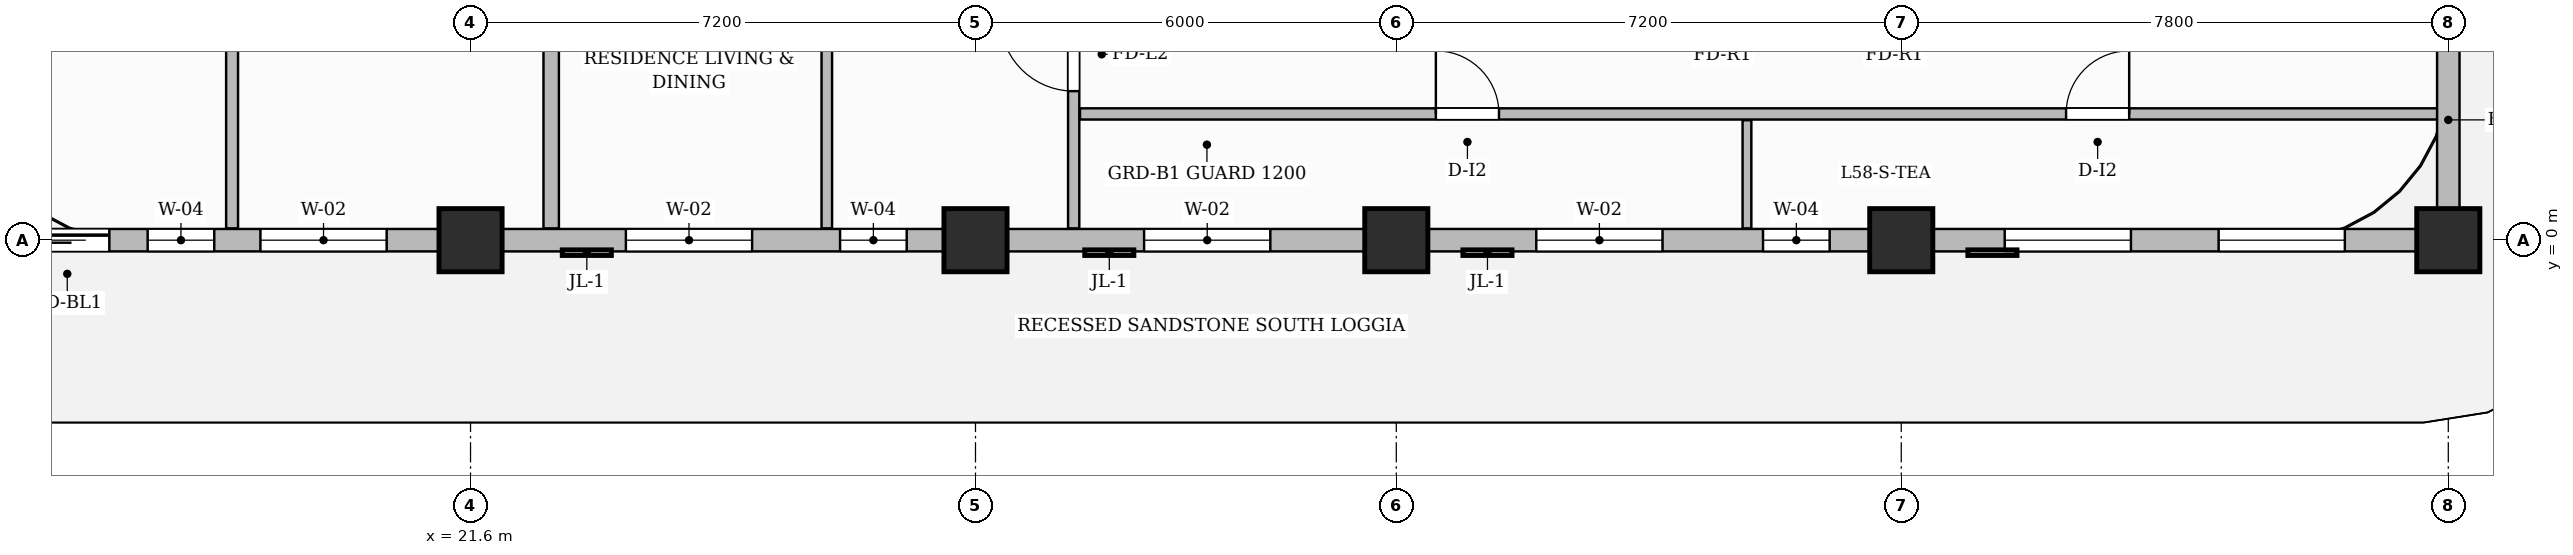
"""IFC4 building model, lengths in metres.
Left out: names, types, materials, properties, quantities, classifications, styles, units other than length and angle.
Written with IfcOpenShell. Run it as: python <this file> out.ifc"""

import sys

from ifc_helpers import new_model, si_unit, direction, frame, frame_2d, origin, origin_2d, place, context, subcontext, project, spatial, rectangle, extrude, source, transform, mapped, element, fill, save


model = new_model("IFC4")
c1 = context("Model", 3, precision=1e-05, world=origin(), true_north=direction((0.0, 1.0)))
c2 = subcontext(c1, "Body", "Model", "MODEL_VIEW")
j1 = project(units=[si_unit("LENGTHUNIT", "METRE"), si_unit("PLANEANGLEUNIT", "RADIAN")], contexts=[c1])
p1 = place(None, origin())
s1 = spatial("IfcSite", under=j1, at=p1, CompositionType="ELEMENT")
p2 = place(p1, origin())
s2 = spatial("IfcBuilding", under=s1, at=p2, CompositionType="ELEMENT")
p3 = place(p2, frame((0.0, 0.0, 232.7)))
s3 = spatial("IfcBuildingStorey", under=s2, at=p3, CompositionType="ELEMENT", Elevation=232.7)
m1 = source(origin(), c2, "Body", "SweptSolid", [
    extrude(rectangle(XDim=0.9, YDim=0.9, at=origin_2d()), origin(), (0.0, 0.0, 1.0), 3.85),
])
for number, where, z_axis, x_axis in (
    (1, (21.6, 0.0, 0.0), (0.0, 0.0, 1.0), (1.0, 0.0, 0.0)),
    (2, (28.8, 0.0, 0.0), (0.0, 0.0, 1.0), (1.0, 0.0, 0.0)),
    (3, (34.8, 0.0, 0.0), (0.0, 0.0, 1.0), (1.0, 0.0, 0.0)),
    (4, (42.0, 0.0, 0.0), (0.0, 0.0, 1.0), (1.0, 0.0, 0.0)),
    (5, (49.8, 0.0, 0.0), (0.0, 0.0, 1.0), (1.0, 0.0, 0.0)),
):
    element("IfcColumn", number, at=place(p3, frame(where, z_axis=z_axis, x_axis=x_axis)), inside=s3, PredefinedType="COLUMN", context=c2, shape_type="MappedRepresentation", body=[
        mapped(m1, transform((0.0, 0.0, 0.0), scale=1.0)),
    ])
p4 = place(p3, frame((30.2, 0.168, 0.0), z_axis=(0.0, 0.0, 1.0), x_axis=(0.0, 1.0, 0.0)))
e6 = element("IfcWall", 6, at=p4, inside=s3, PredefinedType="PARTITIONING", context=c2, shape_type="SweptSolid", body=[
    extrude(rectangle(XDim=9.492, YDim=0.16, at=frame_2d((4.746, 0.0))), origin(), (0.0, 0.0, 1.0), 3.6),
])
p5 = place(p4, frame((1.957, 0.0, 0.0)))
e7 = element("IfcOpeningElement", 7, at=p5, cuts=e6, PredefinedType="OPENING", context=c2, shape_type="SweptSolid", body=[
    extrude(rectangle(XDim=1.05, YDim=2.15, at=frame_2d((0.525, 1.075))), frame((0.0, 0.09, 0.0), z_axis=(0.0, -1.0, 0.0), x_axis=(1.0, 0.0, 0.0)), (0.0, 0.0, 1.0), 0.18),
])
p6 = place(p3, frame((30.29, 1.8, 0.0), z_axis=(0.0, 0.0, 1.0), x_axis=(1.0, 0.0, 0.0)))
e8 = element("IfcWall", 8, at=p6, inside=s3, PredefinedType="PARTITIONING", context=c2, shape_type="SweptSolid", body=[
    extrude(rectangle(XDim=19.37, YDim=0.16, at=frame_2d((9.685, 0.0))), origin(), (0.0, 0.0, 1.0), 3.6),
])
p7 = place(p6, frame((5.074, 0.0, 0.0)))
e9 = element("IfcOpeningElement", 9, at=p7, cuts=e8, PredefinedType="OPENING", context=c2, shape_type="SweptSolid", body=[
    extrude(rectangle(XDim=0.9, YDim=2.15, at=frame_2d((0.45, 1.075))), frame((0.0, 0.09, 0.0), z_axis=(0.0, -1.0, 0.0), x_axis=(1.0, 0.0, 0.0)), (0.0, 0.0, 1.0), 0.18),
])
p8 = place(p6, frame((14.06, 0.0, 0.0)))
e10 = element("IfcOpeningElement", 10, at=p8, cuts=e8, PredefinedType="OPENING", context=c2, shape_type="SweptSolid", body=[
    extrude(rectangle(XDim=0.9, YDim=2.15, at=frame_2d((0.45, 1.075))), frame((0.0, 0.09, 0.0), z_axis=(0.0, -1.0, 0.0), x_axis=(1.0, 0.0, 0.0)), (0.0, 0.0, 1.0), 0.18),
])
p9 = place(p3, frame((39.8, 0.168, 0.0), z_axis=(0.0, 0.0, 1.0), x_axis=(0.0, 1.0, 0.0)))
e11 = element("IfcWall", 11, at=p9, inside=s3, PredefinedType="PARTITIONING", context=c2, shape_type="SweptSolid", body=[
    extrude(rectangle(XDim=1.542, YDim=0.125, at=frame_2d((0.771, 0.0))), origin(), (0.0, 0.0, 1.0), 3.6),
])
p10 = place(p3, frame((18.2, 0.168, 0.0), z_axis=(0.0, 0.0, 1.0), x_axis=(0.0, 1.0, 0.0)))
e12 = element("IfcWall", 12, at=p10, inside=s3, PredefinedType="PARTITIONING", context=c2, shape_type="SweptSolid", body=[
    extrude(rectangle(XDim=9.492, YDim=0.17, at=frame_2d((4.746, 0.0))), origin(), (0.0, 0.0, 1.0), 3.315),
])
p11 = place(p3, frame((22.75, 0.168, 0.0), z_axis=(0.0, 0.0, 1.0), x_axis=(0.0, 1.0, 0.0)))
e13 = element("IfcWall", 13, at=p11, inside=s3, PredefinedType="PARTITIONING", context=c2, shape_type="SweptSolid", body=[
    extrude(rectangle(XDim=9.492, YDim=0.22, at=frame_2d((4.746, 0.0))), origin(), (0.0, 0.0, 1.0), 3.6),
])
p12 = place(p3, frame((26.68, 0.168, 0.0), z_axis=(0.0, 0.0, 1.0), x_axis=(0.0, 1.0, 0.0)))
e14 = element("IfcWall", 14, at=p12, inside=s3, PredefinedType="PARTITIONING", context=c2, shape_type="SweptSolid", body=[
    extrude(rectangle(XDim=9.492, YDim=0.15, at=frame_2d((4.746, 0.0))), origin(), (0.0, 0.0, 1.0), 3.6),
])
p13 = place(p12, frame((8.057, 0.0, 0.0)))
e15 = element("IfcOpeningElement", 15, at=p13, cuts=e14, PredefinedType="OPENING", context=c2, shape_type="SweptSolid", body=[
    extrude(rectangle(XDim=0.9, YDim=2.15, at=frame_2d((0.45, 1.075))), frame((0.0, 0.085, 0.0), z_axis=(0.0, -1.0, 0.0), x_axis=(1.0, 0.0, 0.0)), (0.0, 0.0, 1.0), 0.17),
])
p14 = place(p3, frame((14.4, 0.0, 0.0), z_axis=(0.0, 0.0, 1.0), x_axis=(1.0, 0.0, 0.0)))
e16 = element("IfcWall", 16, at=p14, inside=s3, PredefinedType="SOLIDWALL", context=c2, shape_type="SweptSolid", body=[
    extrude(rectangle(XDim=35.4, YDim=0.32, at=frame_2d((17.7, 0.0))), origin(), (0.0, 0.0, 1.0), 3.135),
])
p15 = place(p14, frame((0.85, 0.0, 0.0)))
e17 = element("IfcOpeningElement", 17, at=p15, cuts=e16, PredefinedType="OPENING", context=c2, shape_type="SweptSolid", body=[
    extrude(rectangle(XDim=1.2, YDim=2.2, at=frame_2d((0.6, 1.1))), frame((0.0, 0.17, 0.0), z_axis=(0.0, -1.0, 0.0), x_axis=(1.0, 0.0, 0.0)), (0.0, 0.0, 1.0), 0.34),
])
p16 = place(p14, frame((2.596, 0.0, 0.8)))
e18 = element("IfcOpeningElement", 18, at=p16, cuts=e16, PredefinedType="OPENING", context=c2, shape_type="SweptSolid", body=[
    extrude(rectangle(XDim=0.95, YDim=1.75, at=frame_2d((0.475, 0.875))), frame((0.0, 0.17, 0.0), z_axis=(0.0, -1.0, 0.0), x_axis=(1.0, 0.0, 0.0)), (0.0, 0.0, 1.0), 0.34),
])
p17 = place(p14, frame((4.204, 0.0, 0.8)))
e19 = element("IfcOpeningElement", 19, at=p17, cuts=e16, PredefinedType="OPENING", context=c2, shape_type="SweptSolid", body=[
    extrude(rectangle(XDim=1.8, YDim=1.85, at=frame_2d((0.9, 0.925))), frame((0.0, 0.17, 0.0), z_axis=(0.0, -1.0, 0.0), x_axis=(1.0, 0.0, 0.0)), (0.0, 0.0, 1.0), 0.34),
])
p18 = place(p14, frame((9.415, 0.0, 0.8)))
e20 = element("IfcOpeningElement", 20, at=p18, cuts=e16, PredefinedType="OPENING", context=c2, shape_type="SweptSolid", body=[
    extrude(rectangle(XDim=1.8, YDim=1.85, at=frame_2d((0.9, 0.925))), frame((0.0, 0.17, 0.0), z_axis=(0.0, -1.0, 0.0), x_axis=(1.0, 0.0, 0.0)), (0.0, 0.0, 1.0), 0.34),
])
p19 = place(p14, frame((12.469, 0.0, 0.8)))
e21 = element("IfcOpeningElement", 21, at=p19, cuts=e16, PredefinedType="OPENING", context=c2, shape_type="SweptSolid", body=[
    extrude(rectangle(XDim=0.95, YDim=1.75, at=frame_2d((0.475, 0.875))), frame((0.0, 0.17, 0.0), z_axis=(0.0, -1.0, 0.0), x_axis=(1.0, 0.0, 0.0)), (0.0, 0.0, 1.0), 0.34),
])
p20 = place(p14, frame((16.804, 0.0, 0.8)))
e22 = element("IfcOpeningElement", 22, at=p20, cuts=e16, PredefinedType="OPENING", context=c2, shape_type="SweptSolid", body=[
    extrude(rectangle(XDim=1.8, YDim=1.85, at=frame_2d((0.9, 0.925))), frame((0.0, 0.17, 0.0), z_axis=(0.0, -1.0, 0.0), x_axis=(1.0, 0.0, 0.0)), (0.0, 0.0, 1.0), 0.34),
])
p21 = place(p14, frame((22.396, 0.0, 0.8)))
e23 = element("IfcOpeningElement", 23, at=p21, cuts=e16, PredefinedType="OPENING", context=c2, shape_type="SweptSolid", body=[
    extrude(rectangle(XDim=1.8, YDim=1.85, at=frame_2d((0.9, 0.925))), frame((0.0, 0.17, 0.0), z_axis=(0.0, -1.0, 0.0), x_axis=(1.0, 0.0, 0.0)), (0.0, 0.0, 1.0), 0.34),
])
p22 = place(p14, frame((25.629, 0.0, 0.8)))
e24 = element("IfcOpeningElement", 24, at=p22, cuts=e16, PredefinedType="OPENING", context=c2, shape_type="SweptSolid", body=[
    extrude(rectangle(XDim=0.95, YDim=1.75, at=frame_2d((0.475, 0.875))), frame((0.0, 0.17, 0.0), z_axis=(0.0, -1.0, 0.0), x_axis=(1.0, 0.0, 0.0)), (0.0, 0.0, 1.0), 0.34),
])
p23 = place(p14, frame((29.075, 0.0, 0.8)))
e25 = element("IfcOpeningElement", 25, at=p23, cuts=e16, PredefinedType="OPENING", context=c2, shape_type="SweptSolid", body=[
    extrude(rectangle(XDim=1.8, YDim=1.85, at=frame_2d((0.9, 0.925))), frame((0.0, 0.17, 0.0), z_axis=(0.0, -1.0, 0.0), x_axis=(1.0, 0.0, 0.0)), (0.0, 0.0, 1.0), 0.34),
])
p24 = place(p14, frame((32.125, 0.0, 0.8)))
e26 = element("IfcOpeningElement", 26, at=p24, cuts=e16, PredefinedType="OPENING", context=c2, shape_type="SweptSolid", body=[
    extrude(rectangle(XDim=1.8, YDim=1.85, at=frame_2d((0.9, 0.925))), frame((0.0, 0.17, 0.0), z_axis=(0.0, -1.0, 0.0), x_axis=(1.0, 0.0, 0.0)), (0.0, 0.0, 1.0), 0.34),
])
p25 = place(p3, frame((49.8, 0.05, 0.0), z_axis=(0.0, 0.0, 1.0), x_axis=(0.0, 1.0, 0.0)))
e27 = element("IfcWall", 27, at=p25, inside=s3, PredefinedType="SOLIDWALL", context=c2, shape_type="SweptSolid", body=[
    extrude(rectangle(XDim=3.33, YDim=0.32, at=frame_2d((1.665, 0.0))), origin(), (0.0, 0.0, 1.0), 3.6),
])
m2 = source(origin(), c2, "Body", "SweptSolid", [
    extrude(rectangle(XDim=1.05, YDim=2.15, at=frame_2d((0.525, 1.075))), frame((0.0, 0.025, 0.0), z_axis=(0.0, -1.0, 0.0), x_axis=(1.0, 0.0, 0.0)), (0.0, 0.0, 1.0), 0.05),
])
p26 = place(p5, origin())
e28 = element("IfcDoor", 28, at=p26, inside=s3, OperationType="SINGLE_SWING_RIGHT", PredefinedType="DOOR", context=c2, shape_type="MappedRepresentation", body=[
    mapped(m2, transform((0.0, 0.0, 0.0), scale=1.0)),
])
fill(e7, e28)
m3 = source(origin(), c2, "Body", "SweptSolid", [
    extrude(rectangle(XDim=0.9, YDim=2.15, at=frame_2d((0.45, 1.075))), frame((0.0, 0.025, 0.0), z_axis=(0.0, -1.0, 0.0), x_axis=(1.0, 0.0, 0.0)), (0.0, 0.0, 1.0), 0.05),
])
p27 = place(p7, origin())
e29 = element("IfcDoor", 29, at=p27, inside=s3, OperationType="SINGLE_SWING_LEFT", PredefinedType="DOOR", context=c2, shape_type="MappedRepresentation", body=[
    mapped(m3, transform((0.0, 0.0, 0.0), scale=1.0)),
])
fill(e9, e29)
p28 = place(p8, origin())
e30 = element("IfcDoor", 30, at=p28, inside=s3, OperationType="SINGLE_SWING_RIGHT", PredefinedType="DOOR", context=c2, shape_type="MappedRepresentation", body=[
    mapped(m3, transform((0.0, 0.0, 0.0), scale=1.0)),
])
fill(e10, e30)
m4 = source(origin(), c2, "Body", "SweptSolid", [
    extrude(rectangle(XDim=1.2, YDim=2.2, at=frame_2d((0.6, 1.1))), frame((0.0, 0.025, 0.0), z_axis=(0.0, -1.0, 0.0), x_axis=(1.0, 0.0, 0.0)), (0.0, 0.0, 1.0), 0.05),
])
p29 = place(p15, origin())
e31 = element("IfcDoor", 31, at=p29, inside=s3, OperationType="SLIDING_TO_LEFT", PredefinedType="DOOR", context=c2, shape_type="MappedRepresentation", body=[
    mapped(m4, transform((0.0, 0.0, 0.0), scale=1.0)),
])
fill(e17, e31)
m5 = source(origin(), c2, "Body", "SweptSolid", [
    extrude(rectangle(XDim=0.95, YDim=1.75, at=frame_2d((0.475, 0.875))), frame((0.0, 0.03, 0.0), z_axis=(0.0, -1.0, 0.0), x_axis=(1.0, 0.0, 0.0)), (0.0, 0.0, 1.0), 0.06),
])
p30 = place(p16, origin())
e32 = element("IfcWindow", 32, at=p30, inside=s3, PartitioningType="SINGLE_PANEL", PredefinedType="WINDOW", context=c2, shape_type="MappedRepresentation", body=[
    mapped(m5, transform((0.0, 0.0, 0.0), scale=1.0)),
])
fill(e18, e32)
m6 = source(origin(), c2, "Body", "SweptSolid", [
    extrude(rectangle(XDim=1.8, YDim=1.85, at=frame_2d((0.9, 0.925))), frame((0.0, 0.03, 0.0), z_axis=(0.0, -1.0, 0.0), x_axis=(1.0, 0.0, 0.0)), (0.0, 0.0, 1.0), 0.06),
])
p31 = place(p17, origin())
e33 = element("IfcWindow", 33, at=p31, inside=s3, PartitioningType="DOUBLE_PANEL_VERTICAL", PredefinedType="WINDOW", context=c2, shape_type="MappedRepresentation", body=[
    mapped(m6, transform((0.0, 0.0, 0.0), scale=1.0)),
])
fill(e19, e33)
p32 = place(p18, origin())
e34 = element("IfcWindow", 34, at=p32, inside=s3, PartitioningType="DOUBLE_PANEL_VERTICAL", PredefinedType="WINDOW", context=c2, shape_type="MappedRepresentation", body=[
    mapped(m6, transform((0.0, 0.0, 0.0), scale=1.0)),
])
fill(e20, e34)
p33 = place(p19, origin())
e35 = element("IfcWindow", 35, at=p33, inside=s3, PartitioningType="SINGLE_PANEL", PredefinedType="WINDOW", context=c2, shape_type="MappedRepresentation", body=[
    mapped(m5, transform((0.0, 0.0, 0.0), scale=1.0)),
])
fill(e21, e35)
p34 = place(p20, origin())
e36 = element("IfcWindow", 36, at=p34, inside=s3, PartitioningType="DOUBLE_PANEL_VERTICAL", PredefinedType="WINDOW", context=c2, shape_type="MappedRepresentation", body=[
    mapped(m6, transform((0.0, 0.0, 0.0), scale=1.0)),
])
fill(e22, e36)
p35 = place(p21, origin())
e37 = element("IfcWindow", 37, at=p35, inside=s3, PartitioningType="DOUBLE_PANEL_VERTICAL", PredefinedType="WINDOW", context=c2, shape_type="MappedRepresentation", body=[
    mapped(m6, transform((0.0, 0.0, 0.0), scale=1.0)),
])
fill(e23, e37)
p36 = place(p22, origin())
e38 = element("IfcWindow", 38, at=p36, inside=s3, PartitioningType="SINGLE_PANEL", PredefinedType="WINDOW", context=c2, shape_type="MappedRepresentation", body=[
    mapped(m5, transform((0.0, 0.0, 0.0), scale=1.0)),
])
fill(e24, e38)
p37 = place(p23, origin())
e39 = element("IfcWindow", 39, at=p37, inside=s3, PartitioningType="DOUBLE_PANEL_VERTICAL", PredefinedType="WINDOW", context=c2, shape_type="MappedRepresentation", body=[
    mapped(m6, transform((0.0, 0.0, 0.0), scale=1.0)),
])
fill(e25, e39)
p38 = place(p24, origin())
e40 = element("IfcWindow", 40, at=p38, inside=s3, PartitioningType="DOUBLE_PANEL_VERTICAL", PredefinedType="WINDOW", context=c2, shape_type="MappedRepresentation", body=[
    mapped(m6, transform((0.0, 0.0, 0.0), scale=1.0)),
])
fill(e26, e40)
save(model, sys.argv[1])
